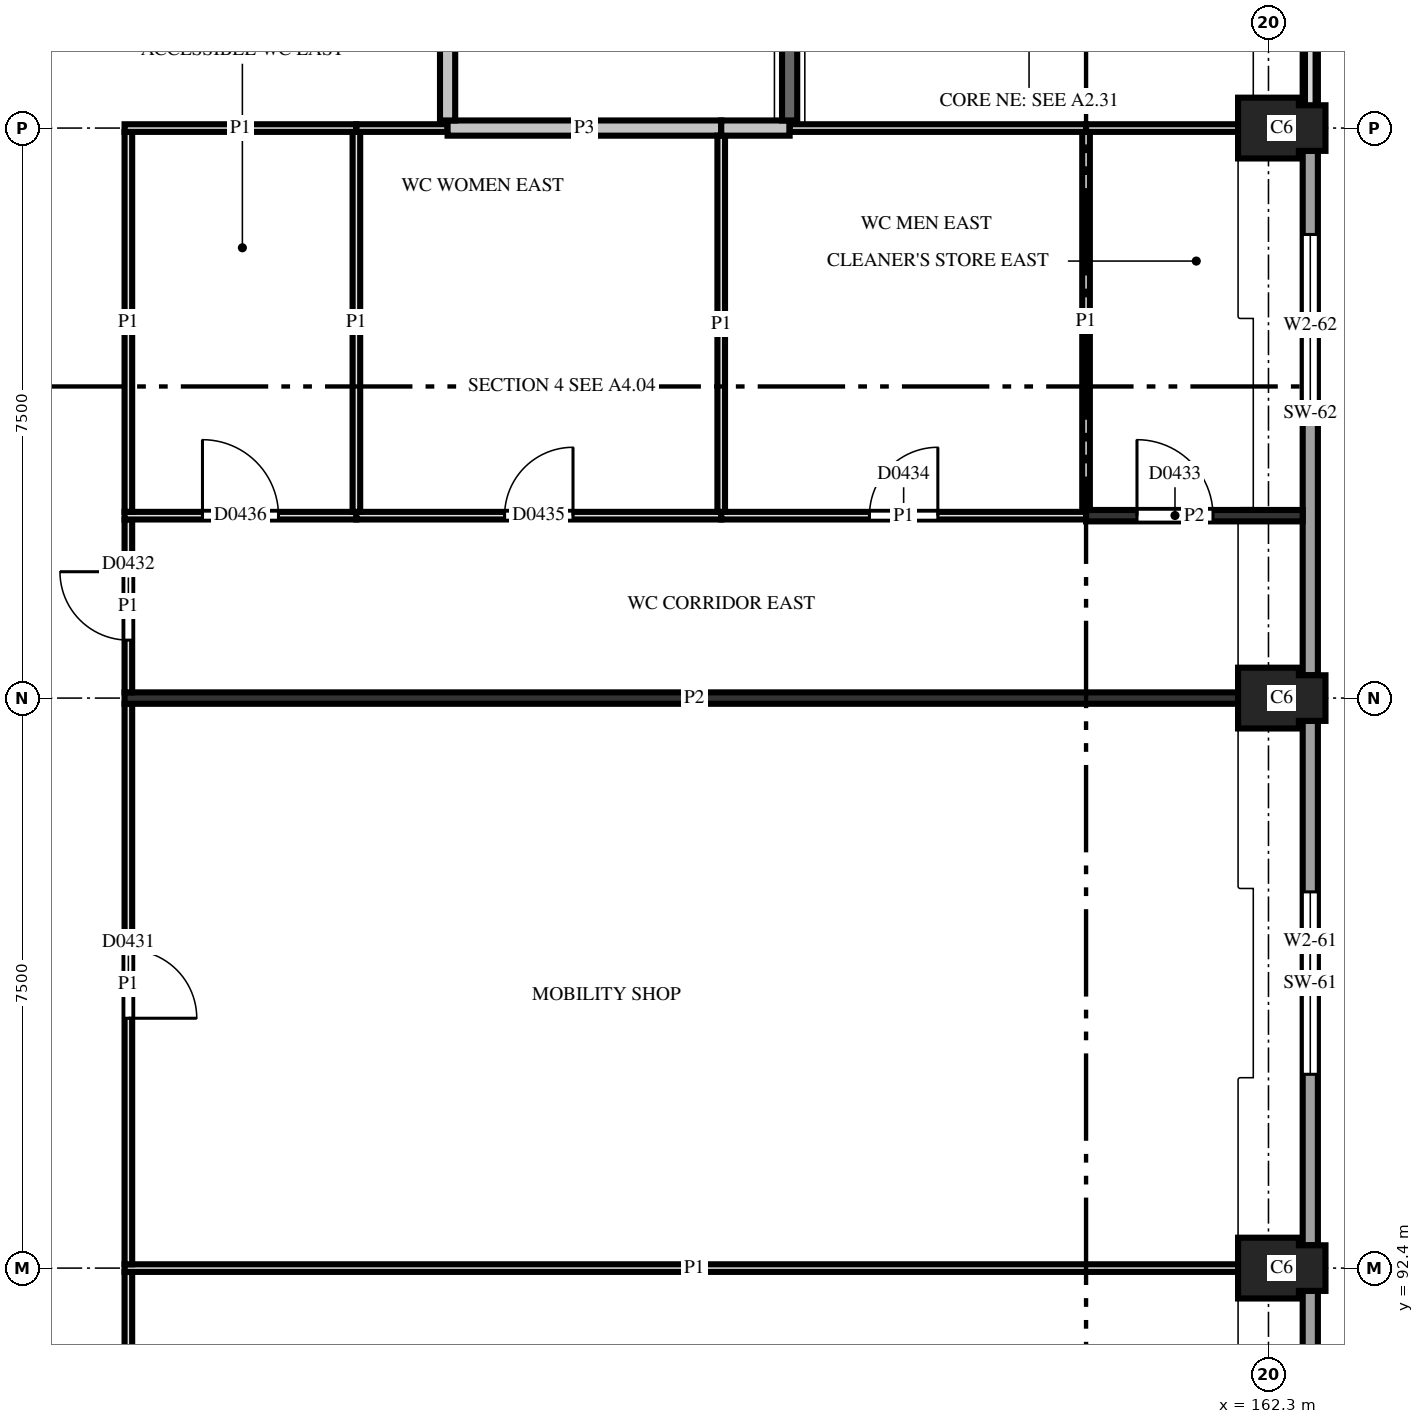
"""IFC4 building model, lengths in metres.
Left out: names, types, materials, properties, quantities, classifications, styles, units other than length and angle.
Written with IfcOpenShell. Run it as: python <this file> out.ifc"""

import sys

from ifc_helpers import new_model, si_unit, direction, frame, frame_2d, origin, place, context, subcontext, project, spatial, polyline, rectangle, outline, extrude, element, fill, save


model = new_model("IFC4")
c1 = context("Model", 3, precision=1e-05, world=origin(), true_north=direction((0.0, 1.0)))
c2 = subcontext(c1, "Body", "Model", "MODEL_VIEW")
j1 = project(units=[si_unit("LENGTHUNIT", "METRE"), si_unit("PLANEANGLEUNIT", "RADIAN")], contexts=[c1])
p1 = place(None, origin())
s1 = spatial("IfcSite", under=j1, at=p1, CompositionType="ELEMENT")
p2 = place(p1, origin())
s2 = spatial("IfcBuilding", under=s1, at=p2, CompositionType="ELEMENT")
p3 = place(p2, frame((0.0, 0.0, 15.6)))
s3 = spatial("IfcBuildingStorey", under=s2, at=p3, CompositionType="ELEMENT", Elevation=15.6)
for number, where, z_axis, x_axis in (
    (1, (162.3, 92.4, 0.0), (0.0, 0.0, 1.0), (1.0, 0.0, 0.0)),
    (2, (162.3, 99.9, 0.0), (0.0, 0.0, 1.0), (1.0, 0.0, 0.0)),
    (3, (162.3, 107.4, 0.0), (0.0, 0.0, 1.0), (1.0, 0.0, 0.0)),
):
    element("IfcColumn", number, at=place(p3, frame(where, z_axis=z_axis, x_axis=x_axis)), inside=s3, PredefinedType="COLUMN", context=c2, shape_type="SweptSolid", body=[
        extrude(outline(polyline([(-0.4, -0.4), (0.4, -0.4), (0.4, -0.3), (0.75, -0.3), (0.75, 0.3), (0.4, 0.3), (0.4, 0.4), (-0.4, 0.4), (-0.4, -0.4)])), origin(), (0.0, 0.0, 1.0), 3.7),
    ])
p4 = place(p3, frame((162.85, 85.2, 0.0), z_axis=(0.0, 0.0, 1.0), x_axis=(0.0, 1.0, 0.0)))
e4 = element("IfcWall", 4, at=p4, inside=s3, PredefinedType="SOLIDWALL", context=c2, shape_type="SweptSolid", body=[
    extrude(rectangle(XDim=6.9, YDim=0.2, at=frame_2d((3.45, 0.0))), origin(), (0.0, 0.0, 1.0), 2.3),
])
p5 = place(p4, frame((2.25, 0.0, 0.55)))
e5 = element("IfcOpeningElement", 5, at=p5, cuts=e4, PredefinedType="OPENING", context=c2, shape_type="SweptSolid", body=[
    extrude(rectangle(XDim=2.4, YDim=1.0, at=frame_2d((1.2, 0.5))), frame((0.0, 0.11, 0.0), z_axis=(0.0, -1.0, 0.0), x_axis=(1.0, 0.0, 0.0)), (0.0, 0.0, 1.0), 0.22),
])
p6 = place(p3, frame((162.85, 92.7, 0.0), z_axis=(0.0, 0.0, 1.0), x_axis=(0.0, 1.0, 0.0)))
e6 = element("IfcWall", 6, at=p6, inside=s3, PredefinedType="SOLIDWALL", context=c2, shape_type="SweptSolid", body=[
    extrude(rectangle(XDim=6.9, YDim=0.2, at=frame_2d((3.45, 0.0))), origin(), (0.0, 0.0, 1.0), 2.3),
])
p7 = place(p6, frame((2.25, 0.0, 0.55)))
e7 = element("IfcOpeningElement", 7, at=p7, cuts=e6, PredefinedType="OPENING", context=c2, shape_type="SweptSolid", body=[
    extrude(rectangle(XDim=2.4, YDim=1.0, at=frame_2d((1.2, 0.5))), frame((0.0, 0.11, 0.0), z_axis=(0.0, -1.0, 0.0), x_axis=(1.0, 0.0, 0.0)), (0.0, 0.0, 1.0), 0.22),
])
p8 = place(p3, frame((162.85, 100.2, 0.0), z_axis=(0.0, 0.0, 1.0), x_axis=(0.0, 1.0, 0.0)))
e8 = element("IfcWall", 8, at=p8, inside=s3, PredefinedType="SOLIDWALL", context=c2, shape_type="SweptSolid", body=[
    extrude(rectangle(XDim=6.9, YDim=0.2, at=frame_2d((3.45, 0.0))), origin(), (0.0, 0.0, 1.0), 2.3),
])
p9 = place(p8, frame((3.4, 0.0, 0.55)))
e9 = element("IfcOpeningElement", 9, at=p9, cuts=e8, PredefinedType="OPENING", context=c2, shape_type="SweptSolid", body=[
    extrude(rectangle(XDim=2.4, YDim=1.0, at=frame_2d((1.2, 0.5))), frame((0.0, 0.11, 0.0), z_axis=(0.0, -1.0, 0.0), x_axis=(1.0, 0.0, 0.0)), (0.0, 0.0, 1.0), 0.22),
])
p10 = place(p3, frame((162.85, 107.7, 0.0), z_axis=(0.0, 0.0, 1.0), x_axis=(0.0, 1.0, 0.0)))
e10 = element("IfcWall", 10, at=p10, inside=s3, PredefinedType="SOLIDWALL", context=c2, shape_type="SweptSolid", body=[
    extrude(rectangle(XDim=6.9, YDim=0.2, at=frame_2d((3.45, 0.0))), origin(), (0.0, 0.0, 1.0), 2.3),
])
p11 = place(p3, frame((147.3, 92.35, 0.0), z_axis=(0.0, 0.0, 1.0), x_axis=(0.0, -1.0, 0.0)))
e11 = element("IfcWall", 11, at=p11, inside=s3, PredefinedType="PARTITIONING", context=c2, shape_type="SweptSolid", body=[
    extrude(rectangle(XDim=14.9, YDim=0.1, at=frame_2d((7.45, 0.0))), origin(), (0.0, 0.0, 1.0), 2.88),
])
p12 = place(p11, frame((7.0, 0.0, 0.0)))
e12 = element("IfcOpeningElement", 12, at=p12, cuts=e11, PredefinedType="OPENING", context=c2, shape_type="SweptSolid", body=[
    extrude(rectangle(XDim=0.9, YDim=2.1, at=frame_2d((0.45, 1.05))), frame((0.0, 0.06, 0.0), z_axis=(0.0, -1.0, 0.0), x_axis=(1.0, 0.0, 0.0)), (0.0, 0.0, 1.0), 0.12),
])
p13 = place(p3, frame((162.24, 92.4, 0.0), z_axis=(0.0, 0.0, 1.0), x_axis=(-1.0, 0.0, 0.0)))
e13 = element("IfcWall", 13, at=p13, inside=s3, PredefinedType="PARTITIONING", context=c2, shape_type="SweptSolid", body=[
    extrude(rectangle(XDim=14.99, YDim=0.1, at=frame_2d((7.495, 0.0))), origin(), (0.0, 0.0, 1.0), 2.88),
])
p14 = place(p3, frame((147.3, 99.825, 0.0), z_axis=(0.0, 0.0, 1.0), x_axis=(0.0, -1.0, 0.0)))
e14 = element("IfcWall", 14, at=p14, inside=s3, PredefinedType="PARTITIONING", context=c2, shape_type="SweptSolid", body=[
    extrude(rectangle(XDim=7.375, YDim=0.1, at=frame_2d((3.688, 0.0))), origin(), (0.0, 0.0, 1.0), 2.88),
])
p15 = place(p14, frame((3.238, 0.0, 0.0)))
e15 = element("IfcOpeningElement", 15, at=p15, cuts=e14, PredefinedType="OPENING", context=c2, shape_type="SweptSolid", body=[
    extrude(rectangle(XDim=0.9, YDim=2.1, at=frame_2d((0.45, 1.05))), frame((0.0, 0.06, 0.0), z_axis=(0.0, -1.0, 0.0), x_axis=(1.0, 0.0, 0.0)), (0.0, 0.0, 1.0), 0.12),
])
p16 = place(p3, frame((162.24, 99.9, 0.0), z_axis=(0.0, 0.0, 1.0), x_axis=(-1.0, 0.0, 0.0)))
e16 = element("IfcWall", 16, at=p16, inside=s3, PredefinedType="PARTITIONING", context=c2, shape_type="SweptSolid", body=[
    extrude(rectangle(XDim=14.99, YDim=0.15, at=frame_2d((7.495, 0.0))), origin(), (0.0, 0.0, 1.0), 2.88),
])
p17 = place(p3, frame((147.3, 102.25, 0.0), z_axis=(0.0, 0.0, 1.0), x_axis=(0.0, -1.0, 0.0)))
e17 = element("IfcWall", 17, at=p17, inside=s3, PredefinedType="PARTITIONING", context=c2, shape_type="SweptSolid", body=[
    extrude(rectangle(XDim=2.275, YDim=0.1, at=frame_2d((1.137, 0.0))), origin(), (0.0, 0.0, 1.0), 2.88),
])
p18 = place(p17, frame((0.688, 0.0, 0.0)))
e18 = element("IfcOpeningElement", 18, at=p18, cuts=e17, PredefinedType="OPENING", context=c2, shape_type="SweptSolid", body=[
    extrude(rectangle(XDim=0.9, YDim=2.1, at=frame_2d((0.45, 1.05))), frame((0.0, 0.06, 0.0), z_axis=(0.0, -1.0, 0.0), x_axis=(1.0, 0.0, 0.0)), (0.0, 0.0, 1.0), 0.12),
])
p19 = place(p3, frame((150.3, 102.3, 0.0), z_axis=(0.0, 0.0, 1.0), x_axis=(-1.0, 0.0, 0.0)))
e19 = element("IfcWall", 19, at=p19, inside=s3, PredefinedType="PARTITIONING", context=c2, shape_type="SweptSolid", body=[
    extrude(rectangle(XDim=3.05, YDim=0.1, at=frame_2d((1.525, 0.0))), origin(), (0.0, 0.0, 1.0), 2.88),
])
p20 = place(p19, frame((1.025, 0.0, 0.0)))
e20 = element("IfcOpeningElement", 20, at=p20, cuts=e19, PredefinedType="OPENING", context=c2, shape_type="SweptSolid", body=[
    extrude(rectangle(XDim=1.0, YDim=2.1, at=frame_2d((0.5, 1.05))), frame((0.0, 0.06, 0.0), z_axis=(0.0, -1.0, 0.0), x_axis=(1.0, 0.0, 0.0)), (0.0, 0.0, 1.0), 0.12),
])
p21 = place(p3, frame((155.1, 102.3, 0.0), z_axis=(0.0, 0.0, 1.0), x_axis=(-1.0, 0.0, 0.0)))
e21 = element("IfcWall", 21, at=p21, inside=s3, PredefinedType="PARTITIONING", context=c2, shape_type="SweptSolid", body=[
    extrude(rectangle(XDim=4.8, YDim=0.1, at=frame_2d((2.4, 0.0))), origin(), (0.0, 0.0, 1.0), 2.88),
])
p22 = place(p21, frame((1.95, 0.0, 0.0)))
e22 = element("IfcOpeningElement", 22, at=p22, cuts=e21, PredefinedType="OPENING", context=c2, shape_type="SweptSolid", body=[
    extrude(rectangle(XDim=0.9, YDim=2.1, at=frame_2d((0.45, 1.05))), frame((0.0, 0.06, 0.0), z_axis=(0.0, -1.0, 0.0), x_axis=(1.0, 0.0, 0.0)), (0.0, 0.0, 1.0), 0.12),
])
p23 = place(p3, frame((159.9, 102.3, 0.0), z_axis=(0.0, 0.0, 1.0), x_axis=(-1.0, 0.0, 0.0)))
e23 = element("IfcWall", 23, at=p23, inside=s3, PredefinedType="PARTITIONING", context=c2, shape_type="SweptSolid", body=[
    extrude(rectangle(XDim=4.8, YDim=0.1, at=frame_2d((2.4, 0.0))), origin(), (0.0, 0.0, 1.0), 2.88),
])
p24 = place(p23, frame((1.95, 0.0, 0.0)))
e24 = element("IfcOpeningElement", 24, at=p24, cuts=e23, PredefinedType="OPENING", context=c2, shape_type="SweptSolid", body=[
    extrude(rectangle(XDim=0.9, YDim=2.1, at=frame_2d((0.45, 1.05))), frame((0.0, 0.06, 0.0), z_axis=(0.0, -1.0, 0.0), x_axis=(1.0, 0.0, 0.0)), (0.0, 0.0, 1.0), 0.12),
])
p25 = place(p3, frame((162.75, 102.3, 0.0), z_axis=(0.0, 0.0, 1.0), x_axis=(-1.0, 0.0, 0.0)))
e25 = element("IfcWall", 25, at=p25, inside=s3, PredefinedType="PARTITIONING", context=c2, shape_type="SweptSolid", body=[
    extrude(rectangle(XDim=2.85, YDim=0.15, at=frame_2d((1.425, 0.0))), origin(), (0.0, 0.0, 1.0), 2.88),
])
p26 = place(p25, frame((1.18, 0.0, 0.0)))
e26 = element("IfcOpeningElement", 26, at=p26, cuts=e25, PredefinedType="OPENING", context=c2, shape_type="SweptSolid", body=[
    extrude(rectangle(XDim=1.0, YDim=2.1, at=frame_2d((0.5, 1.05))), frame((0.0, 0.085, 0.0), z_axis=(0.0, -1.0, 0.0), x_axis=(1.0, 0.0, 0.0)), (0.0, 0.0, 1.0), 0.17),
])
for number, where, z_axis, x_axis in (
    (27, (147.3, 107.35, 0.0), (0.0, 0.0, 1.0), (0.0, -1.0, 0.0)),
    (28, (150.3, 107.35, 0.0), (0.0, 0.0, 1.0), (0.0, -1.0, 0.0)),
):
    element("IfcWall", number, at=place(p3, frame(where, z_axis=z_axis, x_axis=x_axis)), inside=s3, PredefinedType="PARTITIONING", context=c2, shape_type="SweptSolid", body=[
        extrude(rectangle(XDim=5.0, YDim=0.1, at=frame_2d((2.5, 0.0))), origin(), (0.0, 0.0, 1.0), 2.88),
    ])
p27 = place(p3, frame((150.3, 107.4, 0.0), z_axis=(0.0, 0.0, 1.0), x_axis=(-1.0, 0.0, 0.0)))
e29 = element("IfcWall", 29, at=p27, inside=s3, PredefinedType="PARTITIONING", context=c2, shape_type="SweptSolid", body=[
    extrude(rectangle(XDim=3.05, YDim=0.1, at=frame_2d((1.525, 0.0))), origin(), (0.0, 0.0, 1.0), 2.88),
])
p28 = place(p3, frame((151.5, 107.4, 0.0), z_axis=(0.0, 0.0, 1.0), x_axis=(-1.0, 0.0, 0.0)))
e30 = element("IfcWall", 30, at=p28, inside=s3, PredefinedType="PARTITIONING", context=c2, shape_type="SweptSolid", body=[
    extrude(rectangle(XDim=1.2, YDim=0.1, at=frame_2d((0.6, 0.0))), origin(), (0.0, 0.0, 1.0), 2.88),
])
p29 = place(p3, frame((151.5, 107.4, 0.0), z_axis=(0.0, 0.0, 1.0), x_axis=(1.0, 0.0, 0.0)))
e31 = element("IfcWall", 31, at=p29, inside=s3, PredefinedType="PARTITIONING", context=c2, shape_type="SweptSolid", body=[
    extrude(rectangle(XDim=3.6, YDim=0.2, at=frame_2d((1.8, 0.0))), origin(), (0.0, 0.0, 1.0), 2.88),
])
p30 = place(p3, frame((155.1, 107.3, 0.0), z_axis=(0.0, 0.0, 1.0), x_axis=(0.0, -1.0, 0.0)))
e32 = element("IfcWall", 32, at=p30, inside=s3, PredefinedType="PARTITIONING", context=c2, shape_type="SweptSolid", body=[
    extrude(rectangle(XDim=4.95, YDim=0.1, at=frame_2d((2.475, 0.0))), origin(), (0.0, 0.0, 1.0), 2.88),
])
p31 = place(p3, frame((155.1, 107.4, 0.0), z_axis=(0.0, 0.0, 1.0), x_axis=(1.0, 0.0, 0.0)))
e33 = element("IfcWall", 33, at=p31, inside=s3, PredefinedType="PARTITIONING", context=c2, shape_type="SweptSolid", body=[
    extrude(rectangle(XDim=0.9, YDim=0.2, at=frame_2d((0.45, 0.0))), origin(), (0.0, 0.0, 1.0), 2.88),
])
p32 = place(p3, frame((156.0, 107.5, 0.0), z_axis=(0.0, 0.0, 1.0), x_axis=(0.0, 1.0, 0.0)))
e34 = element("IfcWall", 34, at=p32, inside=s3, PredefinedType="PARTITIONING", context=c2, shape_type="SweptSolid", body=[
    extrude(rectangle(XDim=3.725, YDim=0.2, at=frame_2d((1.863, 0.0))), origin(), (0.0, 0.0, 1.0), 2.88),
])
p33 = place(p32, frame((1.363, 0.0, 0.0)))
e35 = element("IfcOpeningElement", 35, at=p33, cuts=e34, PredefinedType="OPENING", context=c2, shape_type="SweptSolid", body=[
    extrude(rectangle(XDim=1.0, YDim=2.1, at=frame_2d((0.5, 1.05))), frame((0.0, 0.11, 0.0), z_axis=(0.0, -1.0, 0.0), x_axis=(1.0, 0.0, 0.0)), (0.0, 0.0, 1.0), 0.22),
])
p34 = place(p3, frame((159.9, 107.35, 0.0), z_axis=(0.0, 0.0, 1.0), x_axis=(0.0, -1.0, 0.0)))
e36 = element("IfcWall", 36, at=p34, inside=s3, PredefinedType="PARTITIONING", context=c2, shape_type="SweptSolid", body=[
    extrude(rectangle(XDim=4.975, YDim=0.1, at=frame_2d((2.488, 0.0))), origin(), (0.0, 0.0, 1.0), 2.88),
])
p35 = place(p3, frame((159.9, 107.4, 0.0), z_axis=(0.0, 0.0, 1.0), x_axis=(-1.0, 0.0, 0.0)))
e37 = element("IfcWall", 37, at=p35, inside=s3, PredefinedType="PARTITIONING", context=c2, shape_type="SweptSolid", body=[
    extrude(rectangle(XDim=3.9, YDim=0.1, at=frame_2d((1.95, 0.0))), origin(), (0.0, 0.0, 1.0), 2.88),
])
p36 = place(p3, frame((162.24, 107.4, 0.0), z_axis=(0.0, 0.0, 1.0), x_axis=(-1.0, 0.0, 0.0)))
e38 = element("IfcWall", 38, at=p36, inside=s3, PredefinedType="PARTITIONING", context=c2, shape_type="SweptSolid", body=[
    extrude(rectangle(XDim=2.34, YDim=0.1, at=frame_2d((1.17, 0.0))), origin(), (0.0, 0.0, 1.0), 2.88),
])
p37 = place(p3, frame((151.5, 115.35, 0.0), z_axis=(0.0, 0.0, 1.0), x_axis=(0.0, -1.0, 0.0)))
e39 = element("IfcWall", 39, at=p37, inside=s3, PredefinedType="PARTITIONING", context=c2, shape_type="SweptSolid", body=[
    extrude(rectangle(XDim=7.85, YDim=0.2, at=frame_2d((3.925, 0.0))), origin(), (0.0, 0.0, 1.0), 2.88),
])
p38 = place(p37, frame((3.68, 0.0, 0.0)))
e40 = element("IfcOpeningElement", 40, at=p38, cuts=e39, PredefinedType="OPENING", context=c2, shape_type="SweptSolid", body=[
    extrude(rectangle(XDim=1.0, YDim=2.1, at=frame_2d((0.5, 1.05))), frame((0.0, 0.11, 0.0), z_axis=(0.0, -1.0, 0.0), x_axis=(1.0, 0.0, 0.0)), (0.0, 0.0, 1.0), 0.22),
])
p39 = place(p7, origin())
e41 = element("IfcWindow", 41, at=p39, inside=s3, PartitioningType="SINGLE_PANEL", PredefinedType="WINDOW", context=c2, shape_type="SweptSolid", body=[
    extrude(rectangle(XDim=2.4, YDim=1.0, at=frame_2d((1.2, 0.5))), frame((0.0, 0.03, 0.0), z_axis=(0.0, -1.0, 0.0), x_axis=(1.0, 0.0, 0.0)), (0.0, 0.0, 1.0), 0.06),
])
fill(e7, e41)
p40 = place(p9, origin())
e42 = element("IfcWindow", 42, at=p40, inside=s3, PartitioningType="SINGLE_PANEL", PredefinedType="WINDOW", context=c2, shape_type="SweptSolid", body=[
    extrude(rectangle(XDim=2.4, YDim=1.0, at=frame_2d((1.2, 0.5))), frame((0.0, 0.03, 0.0), z_axis=(0.0, -1.0, 0.0), x_axis=(1.0, 0.0, 0.0)), (0.0, 0.0, 1.0), 0.06),
])
fill(e9, e42)
p41 = place(p15, origin())
e43 = element("IfcDoor", 43, at=p41, inside=s3, OperationType="SINGLE_SWING_LEFT", PredefinedType="DOOR", context=c2, shape_type="SweptSolid", body=[
    extrude(rectangle(XDim=0.9, YDim=2.1, at=frame_2d((0.45, 1.05))), frame((0.0, 0.025, 0.0), z_axis=(0.0, -1.0, 0.0), x_axis=(1.0, 0.0, 0.0)), (0.0, 0.0, 1.0), 0.05),
])
fill(e15, e43)
p42 = place(p18, origin())
e44 = element("IfcDoor", 44, at=p42, inside=s3, OperationType="SINGLE_SWING_LEFT", PredefinedType="DOOR", context=c2, shape_type="SweptSolid", body=[
    extrude(rectangle(XDim=0.9, YDim=2.1, at=frame_2d((0.45, 1.05))), frame((0.0, 0.025, 0.0), z_axis=(0.0, -1.0, 0.0), x_axis=(1.0, 0.0, 0.0)), (0.0, 0.0, 1.0), 0.05),
])
fill(e18, e44)
p43 = place(p26, origin())
e45 = element("IfcDoor", 45, at=p43, inside=s3, OperationType="SINGLE_SWING_RIGHT", PredefinedType="DOOR", context=c2, shape_type="SweptSolid", body=[
    extrude(rectangle(XDim=1.0, YDim=2.1, at=frame_2d((0.5, 1.05))), frame((0.0, 0.025, 0.0), z_axis=(0.0, -1.0, 0.0), x_axis=(1.0, 0.0, 0.0)), (0.0, 0.0, 1.0), 0.05),
])
fill(e26, e45)
p44 = place(p24, origin())
e46 = element("IfcDoor", 46, at=p44, inside=s3, OperationType="SINGLE_SWING_LEFT", PredefinedType="DOOR", context=c2, shape_type="SweptSolid", body=[
    extrude(rectangle(XDim=0.9, YDim=2.1, at=frame_2d((0.45, 1.05))), frame((0.0, 0.025, 0.0), z_axis=(0.0, -1.0, 0.0), x_axis=(1.0, 0.0, 0.0)), (0.0, 0.0, 1.0), 0.05),
])
fill(e24, e46)
p45 = place(p22, origin())
e47 = element("IfcDoor", 47, at=p45, inside=s3, OperationType="SINGLE_SWING_LEFT", PredefinedType="DOOR", context=c2, shape_type="SweptSolid", body=[
    extrude(rectangle(XDim=0.9, YDim=2.1, at=frame_2d((0.45, 1.05))), frame((0.0, 0.025, 0.0), z_axis=(0.0, -1.0, 0.0), x_axis=(1.0, 0.0, 0.0)), (0.0, 0.0, 1.0), 0.05),
])
fill(e22, e47)
p46 = place(p20, origin())
e48 = element("IfcDoor", 48, at=p46, inside=s3, OperationType="SINGLE_SWING_RIGHT", PredefinedType="DOOR", context=c2, shape_type="SweptSolid", body=[
    extrude(rectangle(XDim=1.0, YDim=2.1, at=frame_2d((0.5, 1.05))), frame((0.0, 0.025, 0.0), z_axis=(0.0, -1.0, 0.0), x_axis=(1.0, 0.0, 0.0)), (0.0, 0.0, 1.0), 0.05),
])
fill(e20, e48)
save(model, sys.argv[1])
